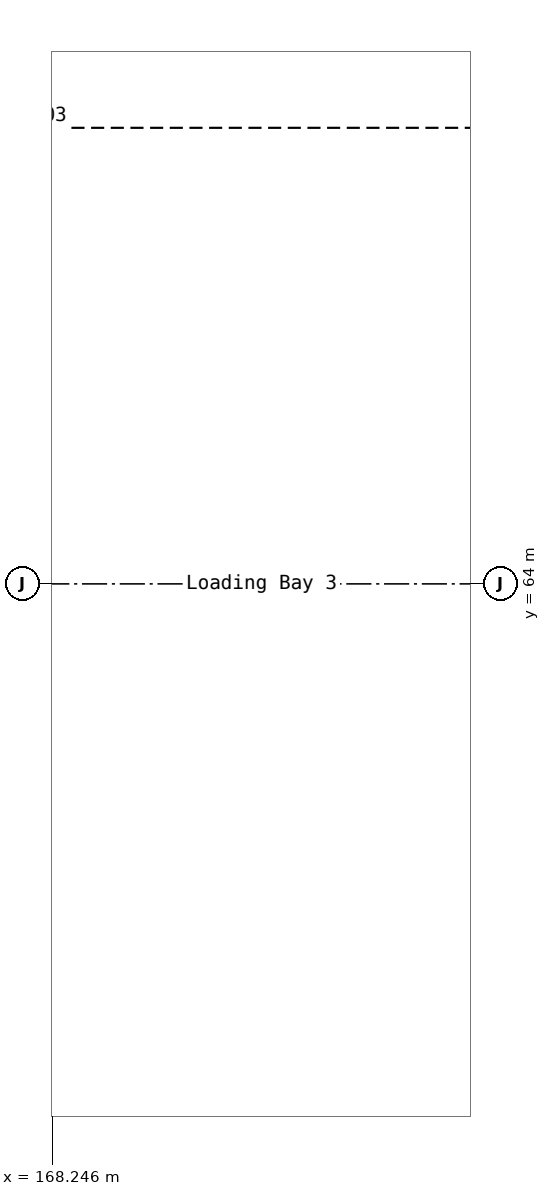
"""IFC4 building model, lengths in metres.
Left out: names, types, materials, properties, quantities, classifications, styles, units other than length and angle.
Written with IfcOpenShell. Run it as: python <this file> out.ifc"""

import sys

from ifc_helpers import new_model, si_unit, direction, frame, frame_2d, origin, place, context, subcontext, project, spatial, rectangle, extrude, element, save


model = new_model("IFC4")
c1 = context("Model", 3, precision=1e-05, world=origin(), true_north=direction((0.0, 1.0)))
c2 = subcontext(c1, "Body", "Model", "MODEL_VIEW")
j1 = project(units=[si_unit("LENGTHUNIT", "METRE"), si_unit("PLANEANGLEUNIT", "RADIAN")], contexts=[c1])
p1 = place(None, origin())
s1 = spatial("IfcSite", under=j1, at=p1, CompositionType="ELEMENT")
p2 = place(p1, origin())
s2 = spatial("IfcBuilding", under=s1, at=p2, CompositionType="ELEMENT")
p3 = place(p2, origin())
s3 = spatial("IfcBuildingStorey", under=s2, at=p3, CompositionType="ELEMENT", Elevation=0.0)
p4 = place(p3, frame((150.0, 70.15, -0.05), z_axis=(0.0, 0.0, 1.0), x_axis=(1.0, 0.0, 0.0)))
e1 = element("IfcWall", 1, at=p4, inside=s3, PredefinedType="SHEAR", context=c2, shape_type="SweptSolid", body=[
    extrude(rectangle(XDim=32.0, YDim=0.3, at=frame_2d((16.0, 0.0))), origin(), (0.0, 0.0, 1.0), 0.9),
])
save(model, sys.argv[1])
